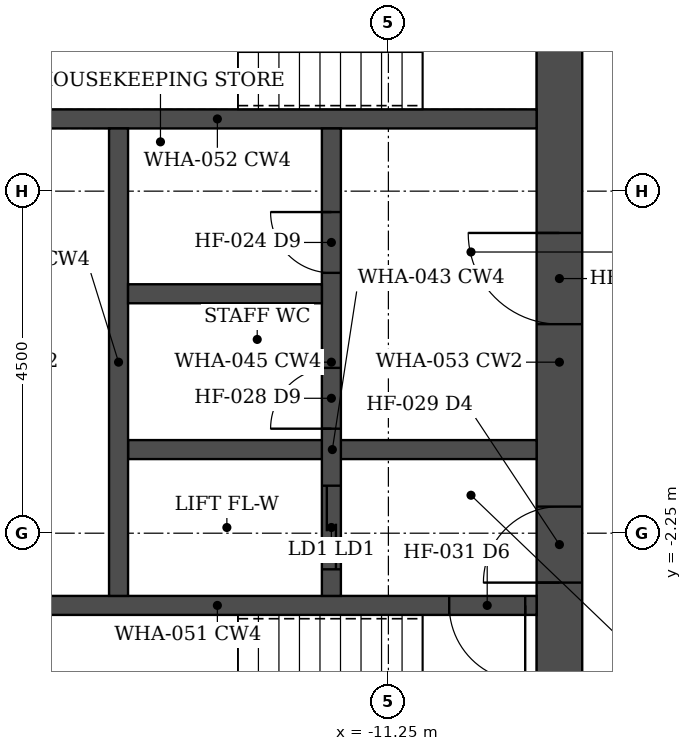
"""IFC4 building model, lengths in metres.
Left out: names, types, materials, properties, quantities, classifications, styles, units other than length and angle.
Written with IfcOpenShell. Run it as: python <this file> out.ifc"""

import sys

from ifc_helpers import new_model, si_unit, direction, frame, frame_2d, origin, place, context, subcontext, project, spatial, rectangle, extrude, element, fill, save


model = new_model("IFC4")
c1 = context("Model", 3, precision=1e-05, world=origin(), true_north=direction((0.0, 1.0)))
c2 = subcontext(c1, "Body", "Model", "MODEL_VIEW")
j1 = project(units=[si_unit("LENGTHUNIT", "METRE"), si_unit("PLANEANGLEUNIT", "RADIAN")], contexts=[c1])
p1 = place(None, origin())
s1 = spatial("IfcSite", under=j1, at=p1, CompositionType="ELEMENT")
p2 = place(p1, origin())
s2 = spatial("IfcBuilding", under=s1, at=p2, CompositionType="ELEMENT")
p3 = place(p2, frame((0.0, 0.0, 172.4)))
s3 = spatial("IfcBuildingStorey", under=s2, at=p3, CompositionType="ELEMENT", Elevation=172.4)
p4 = place(p3, frame((-9.0, -6.45, 0.0), z_axis=(0.0, 0.0, 1.0), x_axis=(0.0, 1.0, 0.0)))
e1 = element("IfcWall", 1, at=p4, inside=s3, PredefinedType="SHEAR", context=c2, shape_type="SweptSolid", body=[
    extrude(rectangle(XDim=12.9, YDim=0.6, at=frame_2d((6.45, 0.0))), origin(), (0.0, 0.0, 1.0), 3.6),
])
p5 = place(p4, frame((3.55, 0.0, 0.0)))
e2 = element("IfcOpeningElement", 2, at=p5, cuts=e1, PredefinedType="OPENING", context=c2, shape_type="SweptSolid", body=[
    extrude(rectangle(XDim=1.0, YDim=2.1, at=frame_2d((0.5, 1.05))), frame((0.0, 0.31, 0.0), z_axis=(0.0, -1.0, 0.0), x_axis=(1.0, 0.0, 0.0)), (0.0, 0.0, 1.0), 0.62),
])
p6 = place(p4, frame((6.95, 0.0, 0.0)))
e3 = element("IfcOpeningElement", 3, at=p6, cuts=e1, PredefinedType="OPENING", context=c2, shape_type="SweptSolid", body=[
    extrude(rectangle(XDim=1.2, YDim=2.1, at=frame_2d((0.6, 1.05))), frame((0.0, 0.31, 0.0), z_axis=(0.0, -1.0, 0.0), x_axis=(1.0, 0.0, 0.0)), (0.0, 0.0, 1.0), 0.62),
])
p7 = place(p4, frame((10.85, 0.0, 0.0)))
e4 = element("IfcOpeningElement", 4, at=p7, cuts=e1, PredefinedType="OPENING", context=c2, shape_type="SweptSolid", body=[
    extrude(rectangle(XDim=1.0, YDim=2.1, at=frame_2d((0.5, 1.05))), frame((0.0, 0.31, 0.0), z_axis=(0.0, -1.0, 0.0), x_axis=(1.0, 0.0, 0.0)), (0.0, 0.0, 1.0), 0.62),
])
p8 = place(p3, frame((-9.3, -3.2, 0.0), z_axis=(0.0, 0.0, 1.0), x_axis=(-1.0, 0.0, 0.0)))
e5 = element("IfcWall", 5, at=p8, inside=s3, PredefinedType="SHEAR", context=c2, shape_type="SweptSolid", body=[
    extrude(rectangle(XDim=8.4, YDim=0.25, at=frame_2d((4.2, 0.0))), origin(), (0.0, 0.0, 1.0), 3.6),
])
p9 = place(p8, frame((0.15, 0.0, 0.0)))
e6 = element("IfcOpeningElement", 6, at=p9, cuts=e5, PredefinedType="OPENING", context=c2, shape_type="SweptSolid", body=[
    extrude(rectangle(XDim=1.0, YDim=2.1, at=frame_2d((0.5, 1.05))), frame((0.0, 0.135, 0.0), z_axis=(0.0, -1.0, 0.0), x_axis=(1.0, 0.0, 0.0)), (0.0, 0.0, 1.0), 0.27),
])
p10 = place(p3, frame((-9.3, 3.2, 0.0), z_axis=(0.0, 0.0, 1.0), x_axis=(-1.0, 0.0, 0.0)))
e7 = element("IfcWall", 7, at=p10, inside=s3, PredefinedType="SHEAR", context=c2, shape_type="SweptSolid", body=[
    extrude(rectangle(XDim=8.4, YDim=0.25, at=frame_2d((4.2, 0.0))), origin(), (0.0, 0.0, 1.0), 3.6),
])
p11 = place(p3, frame((-9.3, -1.15, 0.0), z_axis=(0.0, 0.0, 1.0), x_axis=(-1.0, 0.0, 0.0)))
e8 = element("IfcWall", 8, at=p11, inside=s3, PredefinedType="SHEAR", context=c2, shape_type="SweptSolid", body=[
    extrude(rectangle(XDim=5.375, YDim=0.25, at=frame_2d((2.688, 0.0))), origin(), (0.0, 0.0, 1.0), 3.6),
])
p12 = place(p3, frame((-12.0, -3.075, 0.0), z_axis=(0.0, 0.0, 1.0), x_axis=(0.0, 1.0, 0.0)))
e9 = element("IfcWall", 9, at=p12, inside=s3, PredefinedType="SHEAR", context=c2, shape_type="SweptSolid", body=[
    extrude(rectangle(XDim=6.15, YDim=0.25, at=frame_2d((3.075, 0.0))), origin(), (0.0, 0.0, 1.0), 3.6),
])
p13 = place(p12, frame((2.2, 0.0, 0.0)))
e10 = element("IfcOpeningElement", 10, at=p13, cuts=e9, PredefinedType="OPENING", context=c2, shape_type="SweptSolid", body=[
    extrude(rectangle(XDim=0.8, YDim=2.1, at=frame_2d((0.4, 1.05))), frame((0.0, 0.135, 0.0), z_axis=(0.0, -1.0, 0.0), x_axis=(1.0, 0.0, 0.0)), (0.0, 0.0, 1.0), 0.27),
])
p14 = place(p12, frame((4.25, 0.0, 0.0)))
e11 = element("IfcOpeningElement", 11, at=p14, cuts=e9, PredefinedType="OPENING", context=c2, shape_type="SweptSolid", body=[
    extrude(rectangle(XDim=0.8, YDim=2.1, at=frame_2d((0.4, 1.05))), frame((0.0, 0.135, 0.0), z_axis=(0.0, -1.0, 0.0), x_axis=(1.0, 0.0, 0.0)), (0.0, 0.0, 1.0), 0.27),
])
p15 = place(p12, frame((0.35, 0.0, 0.0)))
e12 = element("IfcOpeningElement", 12, at=p15, cuts=e9, PredefinedType="OPENING", context=c2, shape_type="SweptSolid", body=[
    extrude(rectangle(XDim=1.1, YDim=2.1, at=frame_2d((0.55, 1.05))), frame((0.0, 0.135, 0.0), z_axis=(0.0, -1.0, 0.0), x_axis=(1.0, 0.0, 0.0)), (0.0, 0.0, 1.0), 0.27),
])
p16 = place(p3, frame((-14.8, -3.075, 0.0), z_axis=(0.0, 0.0, 1.0), x_axis=(0.0, 1.0, 0.0)))
e13 = element("IfcWall", 13, at=p16, inside=s3, PredefinedType="SHEAR", context=c2, shape_type="SweptSolid", body=[
    extrude(rectangle(XDim=6.15, YDim=0.25, at=frame_2d((3.075, 0.0))), origin(), (0.0, 0.0, 1.0), 3.6),
])
p17 = place(p3, frame((-12.125, 0.9, 0.0), z_axis=(0.0, 0.0, 1.0), x_axis=(-1.0, 0.0, 0.0)))
e14 = element("IfcWall", 14, at=p17, inside=s3, PredefinedType="SHEAR", context=c2, shape_type="SweptSolid", body=[
    extrude(rectangle(XDim=2.55, YDim=0.25, at=frame_2d((1.275, 0.0))), origin(), (0.0, 0.0, 1.0), 3.6),
])
p18 = place(p5, origin())
e15 = element("IfcDoor", 15, at=p18, inside=s3, OperationType="SINGLE_SWING_LEFT", PredefinedType="DOOR", context=c2, shape_type="SweptSolid", body=[
    extrude(rectangle(XDim=1.0, YDim=2.1, at=frame_2d((0.5, 1.05))), frame((0.0, 0.025, 0.0), z_axis=(0.0, -1.0, 0.0), x_axis=(1.0, 0.0, 0.0)), (0.0, 0.0, 1.0), 0.05),
])
fill(e2, e15)
p19 = place(p9, origin())
e16 = element("IfcDoor", 16, at=p19, inside=s3, OperationType="SINGLE_SWING_LEFT", PredefinedType="DOOR", context=c2, shape_type="SweptSolid", body=[
    extrude(rectangle(XDim=1.0, YDim=2.1, at=frame_2d((0.5, 1.05))), frame((0.0, 0.025, 0.0), z_axis=(0.0, -1.0, 0.0), x_axis=(1.0, 0.0, 0.0)), (0.0, 0.0, 1.0), 0.05),
])
fill(e6, e16)
p20 = place(p6, origin())
e17 = element("IfcDoor", 17, at=p20, inside=s3, OperationType="SINGLE_SWING_RIGHT", PredefinedType="DOOR", context=c2, shape_type="SweptSolid", body=[
    extrude(rectangle(XDim=1.2, YDim=2.1, at=frame_2d((0.6, 1.05))), frame((0.0, 0.025, 0.0), z_axis=(0.0, -1.0, 0.0), x_axis=(1.0, 0.0, 0.0)), (0.0, 0.0, 1.0), 0.05),
])
fill(e3, e17)
p21 = place(p13, origin())
e18 = element("IfcDoor", 18, at=p21, inside=s3, OperationType="SINGLE_SWING_LEFT", PredefinedType="DOOR", context=c2, shape_type="SweptSolid", body=[
    extrude(rectangle(XDim=0.8, YDim=2.1, at=frame_2d((0.4, 1.05))), frame((0.0, 0.025, 0.0), z_axis=(0.0, -1.0, 0.0), x_axis=(1.0, 0.0, 0.0)), (0.0, 0.0, 1.0), 0.05),
])
fill(e10, e18)
p22 = place(p14, origin())
e19 = element("IfcDoor", 19, at=p22, inside=s3, OperationType="SINGLE_SWING_RIGHT", PredefinedType="DOOR", context=c2, shape_type="SweptSolid", body=[
    extrude(rectangle(XDim=0.8, YDim=2.1, at=frame_2d((0.4, 1.05))), frame((0.0, 0.025, 0.0), z_axis=(0.0, -1.0, 0.0), x_axis=(1.0, 0.0, 0.0)), (0.0, 0.0, 1.0), 0.05),
])
fill(e11, e19)
p23 = place(p15, origin())
e20 = element("IfcDoor", 20, at=p23, inside=s3, OperationType="DOUBLE_DOOR_SLIDING", PredefinedType="DOOR", context=c2, shape_type="SweptSolid", body=[
    extrude(rectangle(XDim=1.1, YDim=2.1, at=frame_2d((0.55, 1.05))), frame((0.0, 0.025, 0.0), z_axis=(0.0, -1.0, 0.0), x_axis=(1.0, 0.0, 0.0)), (0.0, 0.0, 1.0), 0.05),
])
fill(e12, e20)
save(model, sys.argv[1])
